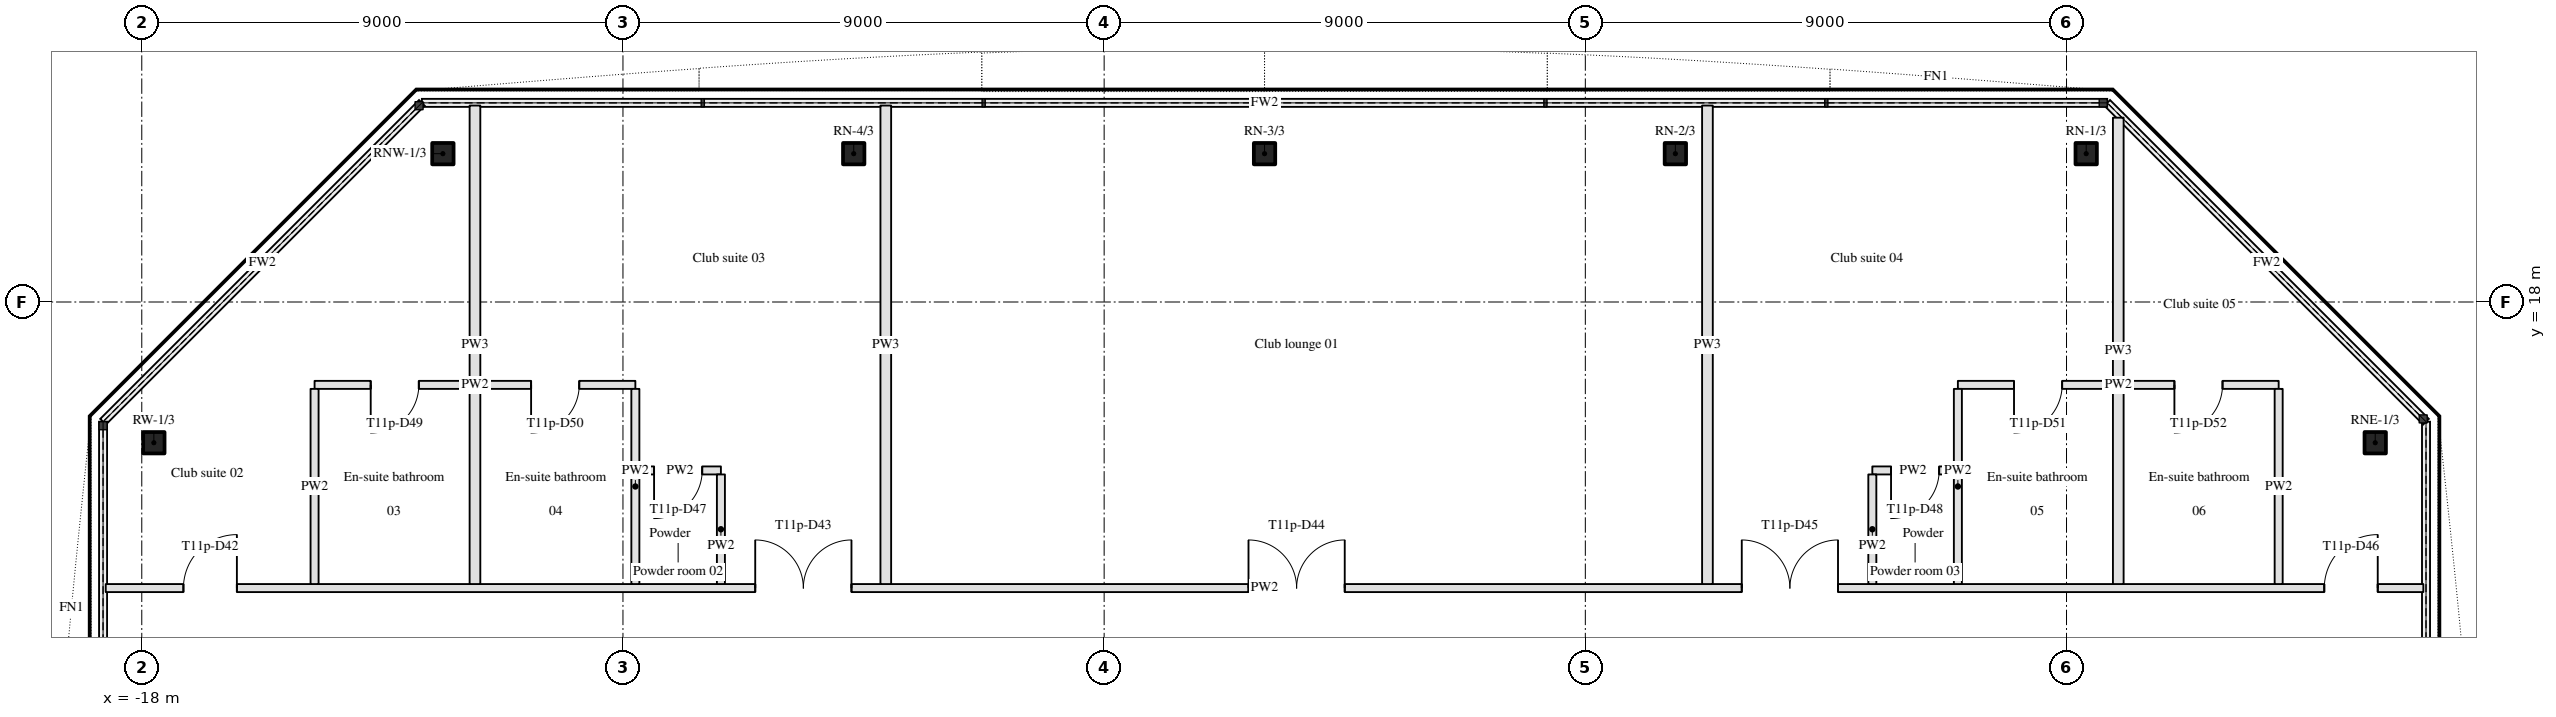
"""IFC4 building model, lengths in metres.
Left out: names, types, materials, properties, quantities, classifications, styles, units other than length and angle.
Written with IfcOpenShell. Run it as: python <this file> out.ifc"""

import sys

from ifc_helpers import new_model, si_unit, direction, frame, frame_2d, origin, origin_2d, place, context, subcontext, project, spatial, rectangle, hollow_rectangle, extrude, element, fill, save


model = new_model("IFC4")
c1 = context("Model", 3, precision=1e-05, world=origin(), true_north=direction((0.0, 1.0)))
c2 = subcontext(c1, "Body", "Model", "MODEL_VIEW")
j1 = project(units=[si_unit("LENGTHUNIT", "METRE"), si_unit("PLANEANGLEUNIT", "RADIAN")], contexts=[c1])
p1 = place(None, origin())
s1 = spatial("IfcSite", under=j1, at=p1, CompositionType="ELEMENT")
p2 = place(p1, origin())
s2 = spatial("IfcBuilding", under=s1, at=p2, CompositionType="ELEMENT")
p3 = place(p2, frame((0.0, 0.0, 158.9)))
s3 = spatial("IfcBuildingStorey", under=s2, at=p3, CompositionType="ELEMENT", Elevation=158.9)
for number, where, z_axis, x_axis in (
    (1, (23.774, 15.368, 0.0), (0.0, 0.0, 1.0), (1.0, 0.0, 0.0)),
    (2, (18.368, 20.774, 0.0), (0.0, 0.0, 1.0), (1.0, 0.0, 0.0)),
    (3, (10.684, 20.774, 0.0), (0.0, 0.0, 1.0), (1.0, 0.0, 0.0)),
    (4, (3.0, 20.774, 0.0), (0.0, 0.0, 1.0), (1.0, 0.0, 0.0)),
    (5, (-4.684, 20.774, 0.0), (0.0, 0.0, 1.0), (1.0, 0.0, 0.0)),
    (6, (-12.368, 20.774, 0.0), (0.0, 0.0, 1.0), (1.0, 0.0, 0.0)),
    (7, (-17.774, 15.368, 0.0), (0.0, 0.0, 1.0), (1.0, 0.0, 0.0)),
):
    element("IfcColumn", number, at=place(p3, frame(where, z_axis=z_axis, x_axis=x_axis)), inside=s3, PredefinedType="COLUMN", context=c2, shape_type="SweptSolid", body=[
        extrude(hollow_rectangle(XDim=0.4, YDim=0.4, WallThickness=0.02, InnerFilletRadius=0.03, OuterFilletRadius=0.05, at=origin_2d()), origin(), (0.0, 0.0, 1.0), 3.4),
    ])
p4 = place(p3, frame((-18.674, 12.65, 0.0), z_axis=(0.0, 0.0, 1.0), x_axis=(1.0, 0.0, 0.0)))
e8 = element("IfcWall", 8, at=p4, inside=s3, PredefinedType="PARTITIONING", context=c2, shape_type="SweptSolid", body=[
    extrude(rectangle(XDim=43.348, YDim=0.15, at=frame_2d((21.674, 0.0))), origin(), (0.0, 0.0, 1.0), 2.46),
])
p5 = place(p4, frame((1.453, 0.0, 0.0)))
e9 = element("IfcOpeningElement", 9, at=p5, cuts=e8, PredefinedType="OPENING", context=c2, shape_type="SweptSolid", body=[
    extrude(rectangle(XDim=1.0, YDim=2.1, at=frame_2d((0.5, 1.05))), frame((0.0, 0.085, 0.0), z_axis=(0.0, -1.0, 0.0), x_axis=(1.0, 0.0, 0.0)), (0.0, 0.0, 1.0), 0.17),
])
p6 = place(p4, frame((12.148, 0.0, 0.0)))
e10 = element("IfcOpeningElement", 10, at=p6, cuts=e8, PredefinedType="OPENING", context=c2, shape_type="SweptSolid", body=[
    extrude(rectangle(XDim=1.8, YDim=2.1, at=frame_2d((0.9, 1.05))), frame((0.0, 0.085, 0.0), z_axis=(0.0, -1.0, 0.0), x_axis=(1.0, 0.0, 0.0)), (0.0, 0.0, 1.0), 0.17),
])
p7 = place(p4, frame((21.374, 0.0, 0.0)))
e11 = element("IfcOpeningElement", 11, at=p7, cuts=e8, PredefinedType="OPENING", context=c2, shape_type="SweptSolid", body=[
    extrude(rectangle(XDim=1.8, YDim=2.1, at=frame_2d((0.9, 1.05))), frame((0.0, 0.085, 0.0), z_axis=(0.0, -1.0, 0.0), x_axis=(1.0, 0.0, 0.0)), (0.0, 0.0, 1.0), 0.17),
])
p8 = place(p4, frame((30.6, 0.0, 0.0)))
e12 = element("IfcOpeningElement", 12, at=p8, cuts=e8, PredefinedType="OPENING", context=c2, shape_type="SweptSolid", body=[
    extrude(rectangle(XDim=1.8, YDim=2.1, at=frame_2d((0.9, 1.05))), frame((0.0, 0.085, 0.0), z_axis=(0.0, -1.0, 0.0), x_axis=(1.0, 0.0, 0.0)), (0.0, 0.0, 1.0), 0.17),
])
p9 = place(p4, frame((41.495, 0.0, 0.0)))
e13 = element("IfcOpeningElement", 13, at=p9, cuts=e8, PredefinedType="OPENING", context=c2, shape_type="SweptSolid", body=[
    extrude(rectangle(XDim=1.0, YDim=2.1, at=frame_2d((0.5, 1.05))), frame((0.0, 0.085, 0.0), z_axis=(0.0, -1.0, 0.0), x_axis=(1.0, 0.0, 0.0)), (0.0, 0.0, 1.0), 0.17),
])
p10 = place(p3, frame((-7.168, 14.85, 0.0), z_axis=(0.0, 0.0, 1.0), x_axis=(-1.0, 0.0, 0.0)))
e14 = element("IfcWall", 14, at=p10, inside=s3, PredefinedType="PARTITIONING", context=c2, shape_type="SweptSolid", body=[
    extrude(rectangle(XDim=1.525, YDim=0.15, at=frame_2d((0.763, 0.0))), origin(), (0.0, 0.0, 1.0), 2.46),
])
p11 = place(p10, frame((0.35, 0.0, 0.0)))
e15 = element("IfcOpeningElement", 15, at=p11, cuts=e14, PredefinedType="OPENING", context=c2, shape_type="SweptSolid", body=[
    extrude(rectangle(XDim=0.9, YDim=2.1, at=frame_2d((0.45, 1.05))), frame((0.0, 0.085, 0.0), z_axis=(0.0, -1.0, 0.0), x_axis=(1.0, 0.0, 0.0)), (0.0, 0.0, 1.0), 0.17),
])
p12 = place(p3, frame((15.893, 14.85, 0.0), z_axis=(0.0, 0.0, 1.0), x_axis=(-1.0, 0.0, 0.0)))
e16 = element("IfcWall", 16, at=p12, inside=s3, PredefinedType="PARTITIONING", context=c2, shape_type="SweptSolid", body=[
    extrude(rectangle(XDim=1.525, YDim=0.15, at=frame_2d((0.763, 0.0))), origin(), (0.0, 0.0, 1.0), 2.46),
])
p13 = place(p12, frame((0.275, 0.0, 0.0)))
e17 = element("IfcOpeningElement", 17, at=p13, cuts=e16, PredefinedType="OPENING", context=c2, shape_type="SweptSolid", body=[
    extrude(rectangle(XDim=0.9, YDim=2.1, at=frame_2d((0.45, 1.05))), frame((0.0, 0.085, 0.0), z_axis=(0.0, -1.0, 0.0), x_axis=(1.0, 0.0, 0.0)), (0.0, 0.0, 1.0), 0.17),
])
p14 = place(p3, frame((-8.768, 16.45, 0.0), z_axis=(0.0, 0.0, 1.0), x_axis=(-1.0, 0.0, 0.0)))
e18 = element("IfcWall", 18, at=p14, inside=s3, PredefinedType="PARTITIONING", context=c2, shape_type="SweptSolid", body=[
    extrude(rectangle(XDim=6.0, YDim=0.15, at=frame_2d((3.0, 0.0))), origin(), (0.0, 0.0, 1.0), 2.46),
])
p15 = place(p14, frame((4.05, 0.0, 0.0)))
e19 = element("IfcOpeningElement", 19, at=p15, cuts=e18, PredefinedType="OPENING", context=c2, shape_type="SweptSolid", body=[
    extrude(rectangle(XDim=0.9, YDim=2.1, at=frame_2d((0.45, 1.05))), frame((0.0, 0.085, 0.0), z_axis=(0.0, -1.0, 0.0), x_axis=(1.0, 0.0, 0.0)), (0.0, 0.0, 1.0), 0.17),
])
p16 = place(p14, frame((1.05, 0.0, 0.0)))
e20 = element("IfcOpeningElement", 20, at=p16, cuts=e18, PredefinedType="OPENING", context=c2, shape_type="SweptSolid", body=[
    extrude(rectangle(XDim=0.9, YDim=2.1, at=frame_2d((0.45, 1.05))), frame((0.0, 0.085, 0.0), z_axis=(0.0, -1.0, 0.0), x_axis=(1.0, 0.0, 0.0)), (0.0, 0.0, 1.0), 0.17),
])
p17 = place(p3, frame((21.968, 16.45, 0.0), z_axis=(0.0, 0.0, 1.0), x_axis=(-1.0, 0.0, 0.0)))
e21 = element("IfcWall", 21, at=p17, inside=s3, PredefinedType="PARTITIONING", context=c2, shape_type="SweptSolid", body=[
    extrude(rectangle(XDim=6.0, YDim=0.15, at=frame_2d((3.0, 0.0))), origin(), (0.0, 0.0, 1.0), 2.46),
])
p18 = place(p17, frame((4.05, 0.0, 0.0)))
e22 = element("IfcOpeningElement", 22, at=p18, cuts=e21, PredefinedType="OPENING", context=c2, shape_type="SweptSolid", body=[
    extrude(rectangle(XDim=0.9, YDim=2.1, at=frame_2d((0.45, 1.05))), frame((0.0, 0.085, 0.0), z_axis=(0.0, -1.0, 0.0), x_axis=(1.0, 0.0, 0.0)), (0.0, 0.0, 1.0), 0.17),
])
p19 = place(p17, frame((1.05, 0.0, 0.0)))
e23 = element("IfcOpeningElement", 23, at=p19, cuts=e21, PredefinedType="OPENING", context=c2, shape_type="SweptSolid", body=[
    extrude(rectangle(XDim=0.9, YDim=2.1, at=frame_2d((0.45, 1.05))), frame((0.0, 0.085, 0.0), z_axis=(0.0, -1.0, 0.0), x_axis=(1.0, 0.0, 0.0)), (0.0, 0.0, 1.0), 0.17),
])
p20 = place(p3, frame((-14.768, 12.725, 0.0), z_axis=(0.0, 0.0, 1.0), x_axis=(0.0, 1.0, 0.0)))
e24 = element("IfcWall", 24, at=p20, inside=s3, PredefinedType="PARTITIONING", context=c2, shape_type="SweptSolid", body=[
    extrude(rectangle(XDim=3.65, YDim=0.15, at=frame_2d((1.825, 0.0))), origin(), (0.0, 0.0, 1.0), 2.46),
])
p21 = place(p3, frame((-11.768, 12.725, 0.0), z_axis=(0.0, 0.0, 1.0), x_axis=(0.0, 1.0, 0.0)))
e25 = element("IfcWall", 25, at=p21, inside=s3, PredefinedType="PARTITIONING", context=c2, shape_type="SweptSolid", body=[
    extrude(rectangle(XDim=8.949, YDim=0.2, at=frame_2d((4.475, 0.0))), origin(), (0.0, 0.0, 1.0), 2.46),
])
p22 = place(p3, frame((-8.768, 12.725, 0.0), z_axis=(0.0, 0.0, 1.0), x_axis=(0.0, 1.0, 0.0)))
e26 = element("IfcWall", 26, at=p22, inside=s3, PredefinedType="PARTITIONING", context=c2, shape_type="SweptSolid", body=[
    extrude(rectangle(XDim=3.65, YDim=0.15, at=frame_2d((1.825, 0.0))), origin(), (0.0, 0.0, 1.0), 2.46),
])
p23 = place(p3, frame((-7.168, 12.725, 0.0), z_axis=(0.0, 0.0, 1.0), x_axis=(0.0, 1.0, 0.0)))
e27 = element("IfcWall", 27, at=p23, inside=s3, PredefinedType="PARTITIONING", context=c2, shape_type="SweptSolid", body=[
    extrude(rectangle(XDim=2.05, YDim=0.15, at=frame_2d((1.025, 0.0))), origin(), (0.0, 0.0, 1.0), 2.46),
])
for number, where, z_axis, x_axis in (
    (28, (-4.084, 12.725, 0.0), (0.0, 0.0, 1.0), (0.0, 1.0, 0.0)),
    (29, (11.284, 12.725, 0.0), (0.0, 0.0, 1.0), (0.0, 1.0, 0.0)),
):
    element("IfcWall", number, at=place(p3, frame(where, z_axis=z_axis, x_axis=x_axis)), inside=s3, PredefinedType="PARTITIONING", context=c2, shape_type="SweptSolid", body=[
        extrude(rectangle(XDim=8.949, YDim=0.2, at=frame_2d((4.475, 0.0))), origin(), (0.0, 0.0, 1.0), 2.46),
    ])
p24 = place(p3, frame((14.368, 12.725, 0.0), z_axis=(0.0, 0.0, 1.0), x_axis=(0.0, 1.0, 0.0)))
e30 = element("IfcWall", 30, at=p24, inside=s3, PredefinedType="PARTITIONING", context=c2, shape_type="SweptSolid", body=[
    extrude(rectangle(XDim=2.05, YDim=0.15, at=frame_2d((1.025, 0.0))), origin(), (0.0, 0.0, 1.0), 2.46),
])
p25 = place(p3, frame((15.968, 12.725, 0.0), z_axis=(0.0, 0.0, 1.0), x_axis=(0.0, 1.0, 0.0)))
e31 = element("IfcWall", 31, at=p25, inside=s3, PredefinedType="PARTITIONING", context=c2, shape_type="SweptSolid", body=[
    extrude(rectangle(XDim=3.65, YDim=0.15, at=frame_2d((1.825, 0.0))), origin(), (0.0, 0.0, 1.0), 2.46),
])
p26 = place(p3, frame((18.968, 12.725, 0.0), z_axis=(0.0, 0.0, 1.0), x_axis=(0.0, 1.0, 0.0)))
e32 = element("IfcWall", 32, at=p26, inside=s3, PredefinedType="PARTITIONING", context=c2, shape_type="SweptSolid", body=[
    extrude(rectangle(XDim=8.722, YDim=0.2, at=frame_2d((4.361, 0.0))), origin(), (0.0, 0.0, 1.0), 2.46),
])
p27 = place(p3, frame((21.968, 12.725, 0.0), z_axis=(0.0, 0.0, 1.0), x_axis=(0.0, 1.0, 0.0)))
e33 = element("IfcWall", 33, at=p27, inside=s3, PredefinedType="PARTITIONING", context=c2, shape_type="SweptSolid", body=[
    extrude(rectangle(XDim=3.65, YDim=0.15, at=frame_2d((1.825, 0.0))), origin(), (0.0, 0.0, 1.0), 2.46),
])
p28 = place(p5, origin())
e34 = element("IfcDoor", 34, at=p28, inside=s3, OperationType="SINGLE_SWING_RIGHT", PredefinedType="DOOR", context=c2, shape_type="SweptSolid", body=[
    extrude(rectangle(XDim=1.0, YDim=2.1, at=frame_2d((0.5, 1.05))), frame((0.0, 0.025, 0.0), z_axis=(0.0, -1.0, 0.0), x_axis=(1.0, 0.0, 0.0)), (0.0, 0.0, 1.0), 0.05),
])
fill(e9, e34)
p29 = place(p6, origin())
e35 = element("IfcDoor", 35, at=p29, inside=s3, OperationType="DOUBLE_DOOR_SINGLE_SWING", PredefinedType="DOOR", context=c2, shape_type="SweptSolid", body=[
    extrude(rectangle(XDim=1.8, YDim=2.1, at=frame_2d((0.9, 1.05))), frame((0.0, 0.025, 0.0), z_axis=(0.0, -1.0, 0.0), x_axis=(1.0, 0.0, 0.0)), (0.0, 0.0, 1.0), 0.05),
])
fill(e10, e35)
p30 = place(p7, origin())
e36 = element("IfcDoor", 36, at=p30, inside=s3, OperationType="DOUBLE_DOOR_SINGLE_SWING", PredefinedType="DOOR", context=c2, shape_type="SweptSolid", body=[
    extrude(rectangle(XDim=1.8, YDim=2.1, at=frame_2d((0.9, 1.05))), frame((0.0, 0.025, 0.0), z_axis=(0.0, -1.0, 0.0), x_axis=(1.0, 0.0, 0.0)), (0.0, 0.0, 1.0), 0.05),
])
fill(e11, e36)
p31 = place(p8, origin())
e37 = element("IfcDoor", 37, at=p31, inside=s3, OperationType="DOUBLE_DOOR_SINGLE_SWING", PredefinedType="DOOR", context=c2, shape_type="SweptSolid", body=[
    extrude(rectangle(XDim=1.8, YDim=2.1, at=frame_2d((0.9, 1.05))), frame((0.0, 0.025, 0.0), z_axis=(0.0, -1.0, 0.0), x_axis=(1.0, 0.0, 0.0)), (0.0, 0.0, 1.0), 0.05),
])
fill(e12, e37)
p32 = place(p9, origin())
e38 = element("IfcDoor", 38, at=p32, inside=s3, OperationType="SINGLE_SWING_RIGHT", PredefinedType="DOOR", context=c2, shape_type="SweptSolid", body=[
    extrude(rectangle(XDim=1.0, YDim=2.1, at=frame_2d((0.5, 1.05))), frame((0.0, 0.025, 0.0), z_axis=(0.0, -1.0, 0.0), x_axis=(1.0, 0.0, 0.0)), (0.0, 0.0, 1.0), 0.05),
])
fill(e13, e38)
p33 = place(p15, origin())
e39 = element("IfcDoor", 39, at=p33, inside=s3, OperationType="SINGLE_SWING_RIGHT", PredefinedType="DOOR", context=c2, shape_type="SweptSolid", body=[
    extrude(rectangle(XDim=0.9, YDim=2.1, at=frame_2d((0.45, 1.05))), frame((0.0, 0.025, 0.0), z_axis=(0.0, -1.0, 0.0), x_axis=(1.0, 0.0, 0.0)), (0.0, 0.0, 1.0), 0.05),
])
fill(e19, e39)
p34 = place(p16, origin())
e40 = element("IfcDoor", 40, at=p34, inside=s3, OperationType="SINGLE_SWING_RIGHT", PredefinedType="DOOR", context=c2, shape_type="SweptSolid", body=[
    extrude(rectangle(XDim=0.9, YDim=2.1, at=frame_2d((0.45, 1.05))), frame((0.0, 0.025, 0.0), z_axis=(0.0, -1.0, 0.0), x_axis=(1.0, 0.0, 0.0)), (0.0, 0.0, 1.0), 0.05),
])
fill(e20, e40)
p35 = place(p11, origin())
e41 = element("IfcDoor", 41, at=p35, inside=s3, OperationType="SINGLE_SWING_RIGHT", PredefinedType="DOOR", context=c2, shape_type="SweptSolid", body=[
    extrude(rectangle(XDim=0.9, YDim=2.1, at=frame_2d((0.45, 1.05))), frame((0.0, 0.025, 0.0), z_axis=(0.0, -1.0, 0.0), x_axis=(1.0, 0.0, 0.0)), (0.0, 0.0, 1.0), 0.05),
])
fill(e15, e41)
p36 = place(p18, origin())
e42 = element("IfcDoor", 42, at=p36, inside=s3, OperationType="SINGLE_SWING_RIGHT", PredefinedType="DOOR", context=c2, shape_type="SweptSolid", body=[
    extrude(rectangle(XDim=0.9, YDim=2.1, at=frame_2d((0.45, 1.05))), frame((0.0, 0.025, 0.0), z_axis=(0.0, -1.0, 0.0), x_axis=(1.0, 0.0, 0.0)), (0.0, 0.0, 1.0), 0.05),
])
fill(e22, e42)
p37 = place(p13, origin())
e43 = element("IfcDoor", 43, at=p37, inside=s3, OperationType="SINGLE_SWING_RIGHT", PredefinedType="DOOR", context=c2, shape_type="SweptSolid", body=[
    extrude(rectangle(XDim=0.9, YDim=2.1, at=frame_2d((0.45, 1.05))), frame((0.0, 0.025, 0.0), z_axis=(0.0, -1.0, 0.0), x_axis=(1.0, 0.0, 0.0)), (0.0, 0.0, 1.0), 0.05),
])
fill(e17, e43)
p38 = place(p19, origin())
e44 = element("IfcDoor", 44, at=p38, inside=s3, OperationType="SINGLE_SWING_RIGHT", PredefinedType="DOOR", context=c2, shape_type="SweptSolid", body=[
    extrude(rectangle(XDim=0.9, YDim=2.1, at=frame_2d((0.45, 1.05))), frame((0.0, 0.025, 0.0), z_axis=(0.0, -1.0, 0.0), x_axis=(1.0, 0.0, 0.0)), (0.0, 0.0, 1.0), 0.05),
])
fill(e23, e44)
save(model, sys.argv[1])
